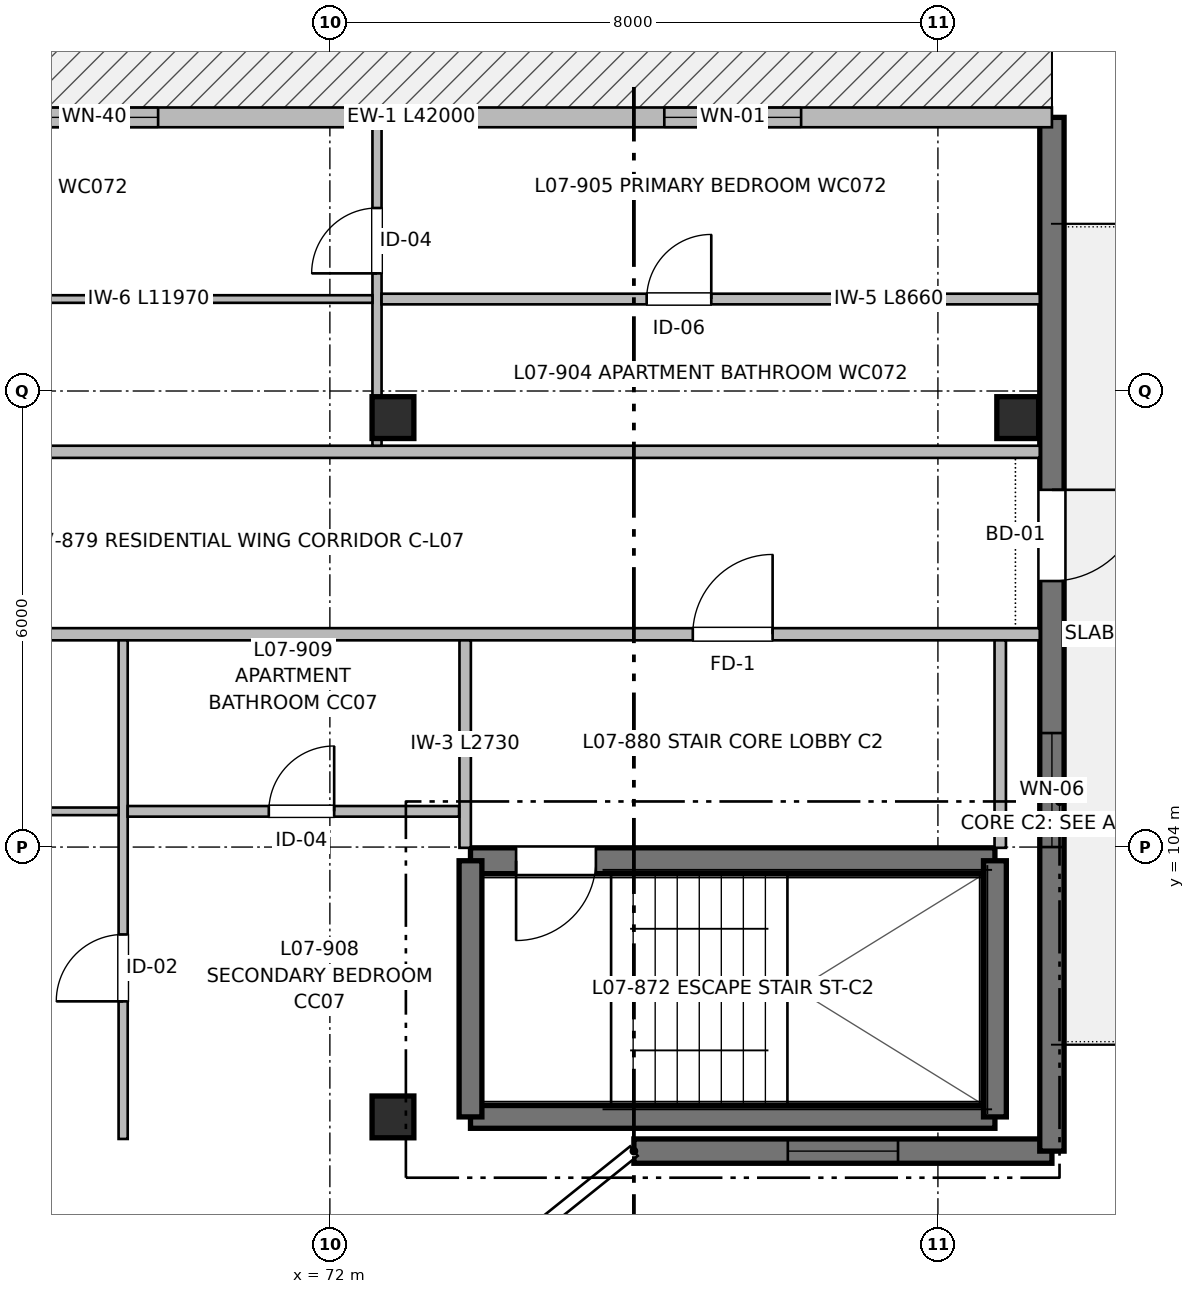
"""IFC4 building model, lengths in metres.
Left out: names, types, materials, properties, quantities, classifications, styles, units other than length and angle.
Written with IfcOpenShell. Run it as: python <this file> out.ifc"""

import sys

from ifc_helpers import new_model, si_unit, direction, frame, frame_2d, origin, origin_2d, place, context, subcontext, project, spatial, rectangle, extrude, element, fill, save


model = new_model("IFC4")
c1 = context("Model", 3, precision=1e-05, world=origin(), true_north=direction((0.0, 1.0)))
c2 = subcontext(c1, "Body", "Model", "MODEL_VIEW")
j1 = project(units=[si_unit("LENGTHUNIT", "METRE"), si_unit("PLANEANGLEUNIT", "RADIAN")], contexts=[c1])
p1 = place(None, origin())
s1 = spatial("IfcSite", under=j1, at=p1, CompositionType="ELEMENT")
p2 = place(p1, origin())
s2 = spatial("IfcBuilding", under=s1, at=p2, CompositionType="ELEMENT")
p3 = place(p2, frame((0.0, 0.0, 23.36)))
s3 = spatial("IfcBuildingStorey", under=s2, at=p3, CompositionType="ELEMENT", Elevation=23.36)
for number, where, z_axis, x_axis in (
    (1, (72.83, 100.45, 0.0), (0.0, 0.0, 1.0), (1.0, 0.0, 0.0)),
    (2, (72.83, 109.65, 0.0), (0.0, 0.0, 1.0), (1.0, 0.0, 0.0)),
    (3, (81.05, 109.65, 0.0), (0.0, 0.0, 1.0), (1.0, 0.0, 0.0)),
):
    element("IfcColumn", number, at=place(p3, frame(where, z_axis=z_axis, x_axis=x_axis)), inside=s3, PredefinedType="COLUMN", context=c2, shape_type="SweptSolid", body=[
        extrude(rectangle(XDim=0.55, YDim=0.55, at=origin_2d()), origin(), (0.0, 0.0, 1.0), 3.2),
    ])
p4 = place(p3, frame((73.85, 100.45, 0.0), z_axis=(0.0, 0.0, 1.0), x_axis=(1.0, 0.0, 0.0)))
e4 = element("IfcWall", 4, at=p4, inside=s3, PredefinedType="SHEAR", context=c2, shape_type="SweptSolid", body=[
    extrude(rectangle(XDim=6.9, YDim=0.3, at=frame_2d((3.45, 0.0))), origin(), (0.0, 0.0, 1.0), 3.2),
])
p5 = place(p3, frame((80.75, 103.82, 0.0), z_axis=(0.0, 0.0, 1.0), x_axis=(-1.0, 0.0, 0.0)))
e5 = element("IfcWall", 5, at=p5, inside=s3, PredefinedType="SHEAR", context=c2, shape_type="SweptSolid", body=[
    extrude(rectangle(XDim=6.9, YDim=0.34, at=frame_2d((3.45, 0.0))), origin(), (0.0, 0.0, 1.0), 3.2),
])
p6 = place(p5, frame((5.25, 0.0, 0.0)))
e6 = element("IfcOpeningElement", 6, at=p6, cuts=e5, PredefinedType="OPENING", context=c2, shape_type="SweptSolid", body=[
    extrude(rectangle(XDim=1.05, YDim=2.15, at=frame_2d((0.525, 1.075))), frame((0.0, 0.18, 0.0), z_axis=(0.0, -1.0, 0.0), x_axis=(1.0, 0.0, 0.0)), (0.0, 0.0, 1.0), 0.36),
])
for number, where, z_axis, x_axis in (
    (7, (73.85, 103.82, 0.0), (0.0, 0.0, 1.0), (0.0, -1.0, 0.0)),
    (8, (80.75, 100.45, 0.0), (0.0, 0.0, 1.0), (0.0, 1.0, 0.0)),
):
    element("IfcWall", number, at=place(p3, frame(where, z_axis=z_axis, x_axis=x_axis)), inside=s3, PredefinedType="SHEAR", context=c2, shape_type="SweptSolid", body=[
        extrude(rectangle(XDim=3.37, YDim=0.3, at=frame_2d((1.685, 0.0))), origin(), (0.0, 0.0, 1.0), 3.2),
    ])
p7 = place(p3, frame((81.5, 100.0, 0.0), z_axis=(0.0, 0.0, 1.0), x_axis=(-1.0, 0.0, 0.0)))
e9 = element("IfcWall", 9, at=p7, inside=s3, PredefinedType="SHEAR", context=c2, shape_type="SweptSolid", body=[
    extrude(rectangle(XDim=5.5, YDim=0.32, at=frame_2d((2.75, 0.0))), origin(), (0.0, 0.0, 1.0), 2.98),
])
p8 = place(p7, frame((2.025, 0.0, 0.77)))
e10 = element("IfcOpeningElement", 10, at=p8, cuts=e9, PredefinedType="OPENING", context=c2, shape_type="SweptSolid", body=[
    extrude(rectangle(XDim=1.45, YDim=1.45, at=frame_2d((0.725, 0.725))), frame((0.0, 0.17, 0.0), z_axis=(0.0, -1.0, 0.0), x_axis=(1.0, 0.0, 0.0)), (0.0, 0.0, 1.0), 0.34),
])
p9 = place(p3, frame((81.5, 113.6, 0.0), z_axis=(0.0, 0.0, 1.0), x_axis=(0.0, -1.0, 0.0)))
e11 = element("IfcWall", 11, at=p9, inside=s3, PredefinedType="SHEAR", context=c2, shape_type="SweptSolid", body=[
    extrude(rectangle(XDim=13.6, YDim=0.32, at=frame_2d((6.8, 0.0))), origin(), (0.0, 0.0, 1.0), 2.98),
])
p10 = place(p9, frame((4.9, 0.0, 0.0)))
e12 = element("IfcOpeningElement", 12, at=p10, cuts=e11, PredefinedType="OPENING", context=c2, shape_type="SweptSolid", body=[
    extrude(rectangle(XDim=1.2, YDim=2.2, at=frame_2d((0.6, 1.1))), frame((0.0, 0.17, 0.0), z_axis=(0.0, -1.0, 0.0), x_axis=(1.0, 0.0, 0.0)), (0.0, 0.0, 1.0), 0.34),
])
p11 = place(p9, frame((8.1, 0.0, 0.82)))
e13 = element("IfcOpeningElement", 13, at=p11, cuts=e11, PredefinedType="OPENING", context=c2, shape_type="SweptSolid", body=[
    extrude(rectangle(XDim=1.5, YDim=1.4, at=frame_2d((0.75, 0.7))), frame((0.0, 0.17, 0.0), z_axis=(0.0, -1.0, 0.0), x_axis=(1.0, 0.0, 0.0)), (0.0, 0.0, 1.0), 0.34),
])
p12 = place(p3, frame((39.5, 113.6, 0.0), z_axis=(0.0, 0.0, 1.0), x_axis=(1.0, 0.0, 0.0)))
e14 = element("IfcWall", 14, at=p12, inside=s3, PredefinedType="SOLIDWALL", context=c2, shape_type="SweptSolid", body=[
    extrude(rectangle(XDim=42.0, YDim=0.26, at=frame_2d((21.0, 0.0))), origin(), (0.0, 0.0, 1.0), 2.98),
])
p13 = place(p12, frame((5.5, 0.0, 0.0)))
e15 = element("IfcOpeningElement", 15, at=p13, cuts=e14, PredefinedType="OPENING", context=c2, shape_type="SweptSolid", body=[
    extrude(rectangle(XDim=1.35, YDim=2.2, at=frame_2d((0.675, 1.1))), frame((0.0, 0.14, 0.0), z_axis=(0.0, -1.0, 0.0), x_axis=(1.0, 0.0, 0.0)), (0.0, 0.0, 1.0), 0.28),
])
p14 = place(p12, frame((3.475, 0.0, 0.77)))
e16 = element("IfcOpeningElement", 16, at=p14, cuts=e14, PredefinedType="OPENING", context=c2, shape_type="SweptSolid", body=[
    extrude(rectangle(XDim=1.45, YDim=1.45, at=frame_2d((0.725, 0.725))), frame((0.0, 0.14, 0.0), z_axis=(0.0, -1.0, 0.0), x_axis=(1.0, 0.0, 0.0)), (0.0, 0.0, 1.0), 0.28),
])
p15 = place(p12, frame((12.475, 0.0, 0.72)))
e17 = element("IfcOpeningElement", 17, at=p15, cuts=e14, PredefinedType="OPENING", context=c2, shape_type="SweptSolid", body=[
    extrude(rectangle(XDim=1.95, YDim=1.5, at=frame_2d((0.975, 0.75))), frame((0.0, 0.14, 0.0), z_axis=(0.0, -1.0, 0.0), x_axis=(1.0, 0.0, 0.0)), (0.0, 0.0, 1.0), 0.28),
])
p16 = place(p12, frame((21.5, 0.0, 0.67)))
e18 = element("IfcOpeningElement", 18, at=p16, cuts=e14, PredefinedType="OPENING", context=c2, shape_type="SweptSolid", body=[
    extrude(rectangle(XDim=2.6, YDim=1.55, at=frame_2d((1.3, 0.775))), frame((0.0, 0.14, 0.0), z_axis=(0.0, -1.0, 0.0), x_axis=(1.0, 0.0, 0.0)), (0.0, 0.0, 1.0), 0.28),
])
p17 = place(p12, frame((28.56, 0.0, 0.72)))
e19 = element("IfcOpeningElement", 19, at=p17, cuts=e14, PredefinedType="OPENING", context=c2, shape_type="SweptSolid", body=[
    extrude(rectangle(XDim=1.68, YDim=1.5, at=frame_2d((0.84, 0.75))), frame((0.0, 0.14, 0.0), z_axis=(0.0, -1.0, 0.0), x_axis=(1.0, 0.0, 0.0)), (0.0, 0.0, 1.0), 0.28),
])
p18 = place(p12, frame((36.9, 0.0, 0.72)))
e20 = element("IfcOpeningElement", 20, at=p18, cuts=e14, PredefinedType="OPENING", context=c2, shape_type="SweptSolid", body=[
    extrude(rectangle(XDim=1.8, YDim=1.5, at=frame_2d((0.9, 0.75))), frame((0.0, 0.14, 0.0), z_axis=(0.0, -1.0, 0.0), x_axis=(1.0, 0.0, 0.0)), (0.0, 0.0, 1.0), 0.28),
])
p19 = place(p3, frame((57.2, 106.8, 0.0), z_axis=(0.0, 0.0, 1.0), x_axis=(1.0, 0.0, 0.0)))
e21 = element("IfcWall", 21, at=p19, inside=s3, PredefinedType="PARTITIONING", context=c2, shape_type="SweptSolid", body=[
    extrude(rectangle(XDim=24.14, YDim=0.16, at=frame_2d((12.07, 0.0))), origin(), (0.0, 0.0, 1.0), 2.935),
])
p20 = place(p19, frame((19.575, 0.0, 0.0)))
e22 = element("IfcOpeningElement", 22, at=p20, cuts=e21, PredefinedType="OPENING", context=c2, shape_type="SweptSolid", body=[
    extrude(rectangle(XDim=1.05, YDim=2.15, at=frame_2d((0.525, 1.075))), frame((0.0, 0.09, 0.0), z_axis=(0.0, -1.0, 0.0), x_axis=(1.0, 0.0, 0.0)), (0.0, 0.0, 1.0), 0.18),
])
p21 = place(p19, frame((8.995, 0.0, 0.0)))
e23 = element("IfcOpeningElement", 23, at=p21, cuts=e21, PredefinedType="OPENING", context=c2, shape_type="SweptSolid", body=[
    extrude(rectangle(XDim=0.98, YDim=2.15, at=frame_2d((0.49, 1.075))), frame((0.0, 0.09, 0.0), z_axis=(0.0, -1.0, 0.0), x_axis=(1.0, 0.0, 0.0)), (0.0, 0.0, 1.0), 0.18),
])
p22 = place(p3, frame((39.66, 109.2, 0.0), z_axis=(0.0, 0.0, 1.0), x_axis=(1.0, 0.0, 0.0)))
e24 = element("IfcWall", 24, at=p22, inside=s3, PredefinedType="PARTITIONING", context=c2, shape_type="SweptSolid", body=[
    extrude(rectangle(XDim=41.68, YDim=0.16, at=frame_2d((20.84, 0.0))), origin(), (0.0, 0.0, 1.0), 2.935),
])
p23 = place(p22, frame((5.525, 0.0, 0.0)))
e25 = element("IfcOpeningElement", 25, at=p23, cuts=e24, PredefinedType="OPENING", context=c2, shape_type="SweptSolid", body=[
    extrude(rectangle(XDim=0.98, YDim=2.15, at=frame_2d((0.49, 1.075))), frame((0.0, 0.09, 0.0), z_axis=(0.0, -1.0, 0.0), x_axis=(1.0, 0.0, 0.0)), (0.0, 0.0, 1.0), 0.18),
])
p24 = place(p22, frame((26.455, 0.0, 0.0)))
e26 = element("IfcOpeningElement", 26, at=p24, cuts=e24, PredefinedType="OPENING", context=c2, shape_type="SweptSolid", body=[
    extrude(rectangle(XDim=0.98, YDim=2.15, at=frame_2d((0.49, 1.075))), frame((0.0, 0.09, 0.0), z_axis=(0.0, -1.0, 0.0), x_axis=(1.0, 0.0, 0.0)), (0.0, 0.0, 1.0), 0.18),
])
for number, where, z_axis, x_axis in (
    (27, (73.78, 103.99, 0.0), (0.0, 0.0, 1.0), (0.0, 1.0, 0.0)),
    (28, (80.82, 103.99, 0.0), (0.0, 0.0, 1.0), (0.0, 1.0, 0.0)),
):
    element("IfcWall", number, at=place(p3, frame(where, z_axis=z_axis, x_axis=x_axis)), inside=s3, PredefinedType="PARTITIONING", context=c2, shape_type="SweptSolid", body=[
        extrude(rectangle(XDim=2.73, YDim=0.15, at=frame_2d((1.365, 0.0))), origin(), (0.0, 0.0, 1.0), 2.935),
    ])
p25 = place(p3, frame((72.62, 109.28, 0.0), z_axis=(0.0, 0.0, 1.0), x_axis=(0.0, 1.0, 0.0)))
e29 = element("IfcWall", 29, at=p25, inside=s3, PredefinedType="PARTITIONING", context=c2, shape_type="SweptSolid", body=[
    extrude(rectangle(XDim=4.19, YDim=0.12, at=frame_2d((2.095, 0.0))), origin(), (0.0, 0.0, 1.0), 2.935),
])
p26 = place(p25, frame((2.268, 0.0, 0.0)))
e30 = element("IfcOpeningElement", 30, at=p26, cuts=e29, PredefinedType="OPENING", context=c2, shape_type="SweptSolid", body=[
    extrude(rectangle(XDim=0.86, YDim=2.1, at=frame_2d((0.43, 1.05))), frame((0.0, 0.07, 0.0), z_axis=(0.0, -1.0, 0.0), x_axis=(1.0, 0.0, 0.0)), (0.0, 0.0, 1.0), 0.14),
])
p27 = place(p3, frame((72.68, 111.21, 0.0), z_axis=(0.0, 0.0, 1.0), x_axis=(1.0, 0.0, 0.0)))
e31 = element("IfcWall", 31, at=p27, inside=s3, PredefinedType="PARTITIONING", context=c2, shape_type="SweptSolid", body=[
    extrude(rectangle(XDim=8.66, YDim=0.14, at=frame_2d((4.33, 0.0))), origin(), (0.0, 0.0, 1.0), 2.935),
])
p28 = place(p27, frame((3.488, 0.0, 0.0)))
e32 = element("IfcOpeningElement", 32, at=p28, cuts=e31, PredefinedType="OPENING", context=c2, shape_type="SweptSolid", body=[
    extrude(rectangle(XDim=0.85, YDim=2.05, at=frame_2d((0.425, 1.025))), frame((0.0, 0.08, 0.0), z_axis=(0.0, -1.0, 0.0), x_axis=(1.0, 0.0, 0.0)), (0.0, 0.0, 1.0), 0.16),
])
p29 = place(p3, frame((60.59, 111.21, 0.0), z_axis=(0.0, 0.0, 1.0), x_axis=(1.0, 0.0, 0.0)))
e33 = element("IfcWall", 33, at=p29, inside=s3, PredefinedType="PARTITIONING", context=c2, shape_type="SweptSolid", body=[
    extrude(rectangle(XDim=11.97, YDim=0.1, at=frame_2d((5.985, 0.0))), origin(), (0.0, 0.0, 1.0), 2.935),
])
p30 = place(p29, frame((4.812, 0.0, 0.0)))
e34 = element("IfcOpeningElement", 34, at=p30, cuts=e33, PredefinedType="OPENING", context=c2, shape_type="SweptSolid", body=[
    extrude(rectangle(XDim=0.92, YDim=2.1, at=frame_2d((0.46, 1.05))), frame((0.0, 0.06, 0.0), z_axis=(0.0, -1.0, 0.0), x_axis=(1.0, 0.0, 0.0)), (0.0, 0.0, 1.0), 0.12),
])
p31 = place(p3, frame((69.28, 100.16, 0.0), z_axis=(0.0, 0.0, 1.0), x_axis=(0.0, 1.0, 0.0)))
e35 = element("IfcWall", 35, at=p31, inside=s3, PredefinedType="PARTITIONING", context=c2, shape_type="SweptSolid", body=[
    extrude(rectangle(XDim=6.56, YDim=0.12, at=frame_2d((3.28, 0.0))), origin(), (0.0, 0.0, 1.0), 2.935),
])
p32 = place(p31, frame((1.81, 0.0, 0.0)))
e36 = element("IfcOpeningElement", 36, at=p32, cuts=e35, PredefinedType="OPENING", context=c2, shape_type="SweptSolid", body=[
    extrude(rectangle(XDim=0.88, YDim=2.1, at=frame_2d((0.44, 1.05))), frame((0.0, 0.07, 0.0), z_axis=(0.0, -1.0, 0.0), x_axis=(1.0, 0.0, 0.0)), (0.0, 0.0, 1.0), 0.14),
])
p33 = place(p3, frame((69.34, 104.47, 0.0), z_axis=(0.0, 0.0, 1.0), x_axis=(1.0, 0.0, 0.0)))
e37 = element("IfcWall", 37, at=p33, inside=s3, PredefinedType="PARTITIONING", context=c2, shape_type="SweptSolid", body=[
    extrude(rectangle(XDim=4.36, YDim=0.14, at=frame_2d((2.18, 0.0))), origin(), (0.0, 0.0, 1.0), 2.935),
])
p34 = place(p33, frame((1.856, 0.0, 0.0)))
e38 = element("IfcOpeningElement", 38, at=p34, cuts=e37, PredefinedType="OPENING", context=c2, shape_type="SweptSolid", body=[
    extrude(rectangle(XDim=0.86, YDim=2.1, at=frame_2d((0.43, 1.05))), frame((0.0, 0.08, 0.0), z_axis=(0.0, -1.0, 0.0), x_axis=(1.0, 0.0, 0.0)), (0.0, 0.0, 1.0), 0.16),
])
p35 = place(p3, frame((64.09, 104.47, 0.0), z_axis=(0.0, 0.0, 1.0), x_axis=(1.0, 0.0, 0.0)))
e39 = element("IfcWall", 39, at=p35, inside=s3, PredefinedType="PARTITIONING", context=c2, shape_type="SweptSolid", body=[
    extrude(rectangle(XDim=5.13, YDim=0.1, at=frame_2d((2.565, 0.0))), origin(), (0.0, 0.0, 1.0), 2.935),
])
p36 = place(p35, frame((2.18, 0.0, 0.0)))
e40 = element("IfcOpeningElement", 40, at=p36, cuts=e39, PredefinedType="OPENING", context=c2, shape_type="SweptSolid", body=[
    extrude(rectangle(XDim=0.92, YDim=2.1, at=frame_2d((0.46, 1.05))), frame((0.0, 0.06, 0.0), z_axis=(0.0, -1.0, 0.0), x_axis=(1.0, 0.0, 0.0)), (0.0, 0.0, 1.0), 0.12),
])
p37 = place(p6, origin())
e41 = element("IfcDoor", 41, at=p37, inside=s3, OperationType="SINGLE_SWING_RIGHT", PredefinedType="DOOR", context=c2, shape_type="SweptSolid", body=[
    extrude(rectangle(XDim=1.05, YDim=2.15, at=frame_2d((0.525, 1.075))), frame((0.0, 0.025, 0.0), z_axis=(0.0, -1.0, 0.0), x_axis=(1.0, 0.0, 0.0)), (0.0, 0.0, 1.0), 0.05),
])
fill(e6, e41)
p38 = place(p8, origin())
e42 = element("IfcWindow", 42, at=p38, inside=s3, PartitioningType="SINGLE_PANEL", PredefinedType="WINDOW", context=c2, shape_type="SweptSolid", body=[
    extrude(rectangle(XDim=1.45, YDim=1.45, at=frame_2d((0.725, 0.725))), frame((0.0, 0.03, 0.0), z_axis=(0.0, -1.0, 0.0), x_axis=(1.0, 0.0, 0.0)), (0.0, 0.0, 1.0), 0.06),
])
fill(e10, e42)
p39 = place(p10, origin())
e43 = element("IfcDoor", 43, at=p39, inside=s3, OperationType="SINGLE_SWING_LEFT", PredefinedType="DOOR", context=c2, shape_type="SweptSolid", body=[
    extrude(rectangle(XDim=1.2, YDim=2.2, at=frame_2d((0.6, 1.1))), frame((0.0, 0.025, 0.0), z_axis=(0.0, -1.0, 0.0), x_axis=(1.0, 0.0, 0.0)), (0.0, 0.0, 1.0), 0.05),
])
fill(e12, e43)
p40 = place(p11, origin())
e44 = element("IfcWindow", 44, at=p40, inside=s3, PartitioningType="SINGLE_PANEL", PredefinedType="WINDOW", context=c2, shape_type="SweptSolid", body=[
    extrude(rectangle(XDim=1.5, YDim=1.4, at=frame_2d((0.75, 0.7))), frame((0.0, 0.03, 0.0), z_axis=(0.0, -1.0, 0.0), x_axis=(1.0, 0.0, 0.0)), (0.0, 0.0, 1.0), 0.06),
])
fill(e13, e44)
p41 = place(p17, origin())
e45 = element("IfcWindow", 45, at=p41, inside=s3, PartitioningType="SINGLE_PANEL", PredefinedType="WINDOW", context=c2, shape_type="SweptSolid", body=[
    extrude(rectangle(XDim=1.68, YDim=1.5, at=frame_2d((0.84, 0.75))), frame((0.0, 0.03, 0.0), z_axis=(0.0, -1.0, 0.0), x_axis=(1.0, 0.0, 0.0)), (0.0, 0.0, 1.0), 0.06),
])
fill(e19, e45)
p42 = place(p18, origin())
e46 = element("IfcWindow", 46, at=p42, inside=s3, PartitioningType="SINGLE_PANEL", PredefinedType="WINDOW", context=c2, shape_type="SweptSolid", body=[
    extrude(rectangle(XDim=1.8, YDim=1.5, at=frame_2d((0.9, 0.75))), frame((0.0, 0.03, 0.0), z_axis=(0.0, -1.0, 0.0), x_axis=(1.0, 0.0, 0.0)), (0.0, 0.0, 1.0), 0.06),
])
fill(e20, e46)
p43 = place(p20, origin())
e47 = element("IfcDoor", 47, at=p43, inside=s3, OperationType="SINGLE_SWING_RIGHT", PredefinedType="DOOR", context=c2, shape_type="SweptSolid", body=[
    extrude(rectangle(XDim=1.05, YDim=2.15, at=frame_2d((0.525, 1.075))), frame((0.0, 0.025, 0.0), z_axis=(0.0, -1.0, 0.0), x_axis=(1.0, 0.0, 0.0)), (0.0, 0.0, 1.0), 0.05),
])
fill(e22, e47)
p44 = place(p26, origin())
e48 = element("IfcDoor", 48, at=p44, inside=s3, OperationType="SINGLE_SWING_LEFT", PredefinedType="DOOR", context=c2, shape_type="SweptSolid", body=[
    extrude(rectangle(XDim=0.86, YDim=2.1, at=frame_2d((0.43, 1.05))), frame((0.0, 0.025, 0.0), z_axis=(0.0, -1.0, 0.0), x_axis=(1.0, 0.0, 0.0)), (0.0, 0.0, 1.0), 0.05),
])
fill(e30, e48)
p45 = place(p28, origin())
e49 = element("IfcDoor", 49, at=p45, inside=s3, OperationType="SINGLE_SWING_RIGHT", PredefinedType="DOOR", context=c2, shape_type="SweptSolid", body=[
    extrude(rectangle(XDim=0.85, YDim=2.05, at=frame_2d((0.425, 1.025))), frame((0.0, 0.025, 0.0), z_axis=(0.0, -1.0, 0.0), x_axis=(1.0, 0.0, 0.0)), (0.0, 0.0, 1.0), 0.05),
])
fill(e32, e49)
p46 = place(p32, origin())
e50 = element("IfcDoor", 50, at=p46, inside=s3, OperationType="SINGLE_SWING_LEFT", PredefinedType="DOOR", context=c2, shape_type="SweptSolid", body=[
    extrude(rectangle(XDim=0.88, YDim=2.1, at=frame_2d((0.44, 1.05))), frame((0.0, 0.025, 0.0), z_axis=(0.0, -1.0, 0.0), x_axis=(1.0, 0.0, 0.0)), (0.0, 0.0, 1.0), 0.05),
])
fill(e36, e50)
p47 = place(p34, origin())
e51 = element("IfcDoor", 51, at=p47, inside=s3, OperationType="SINGLE_SWING_RIGHT", PredefinedType="DOOR", context=c2, shape_type="SweptSolid", body=[
    extrude(rectangle(XDim=0.86, YDim=2.1, at=frame_2d((0.43, 1.05))), frame((0.0, 0.025, 0.0), z_axis=(0.0, -1.0, 0.0), x_axis=(1.0, 0.0, 0.0)), (0.0, 0.0, 1.0), 0.05),
])
fill(e38, e51)
save(model, sys.argv[1])
